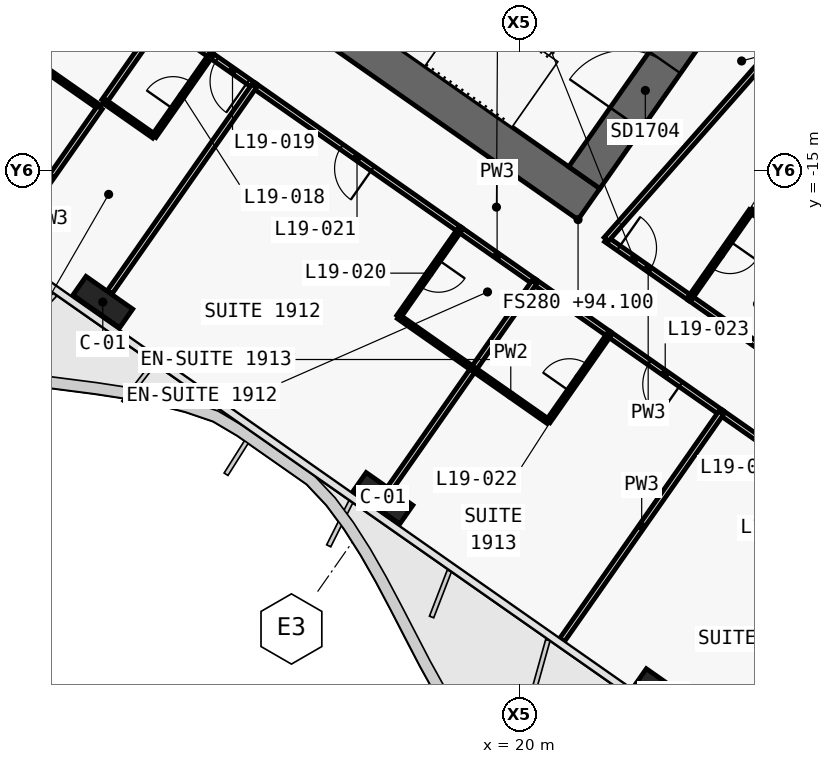
"""IFC4 building model, lengths in metres.
Left out: names, types, materials, properties, quantities, classifications, styles, units other than length and angle.
Written with IfcOpenShell. Run it as: python <this file> out.ifc"""

import sys

from ifc_helpers import new_model, si_unit, direction, frame, frame_2d, origin, origin_2d, place, context, subcontext, project, spatial, polyline, rectangle, outline, extrude, element, fill, save


model = new_model("IFC4")
c1 = context("Model", 3, precision=1e-05, world=origin(), true_north=direction((0.0, 1.0)))
c2 = subcontext(c1, "Body", "Model", "MODEL_VIEW")
j1 = project(units=[si_unit("LENGTHUNIT", "METRE"), si_unit("PLANEANGLEUNIT", "RADIAN")], contexts=[c1])
p1 = place(None, origin())
s1 = spatial("IfcSite", under=j1, at=p1, CompositionType="ELEMENT")
p2 = place(p1, origin())
s2 = spatial("IfcBuilding", under=s1, at=p2, CompositionType="ELEMENT")
p3 = place(p2, frame((0.0, 0.0, 94.1)))
s3 = spatial("IfcBuildingStorey", under=s2, at=p3, CompositionType="ELEMENT", Elevation=94.1)
p4 = place(p3, frame((-0.037, -0.585, 0.0), z_axis=(0.0, 0.0, 1.0), x_axis=(0.819157152511, -0.573569140985, 0.0)))
e1 = element("IfcWall", 1, at=p4, inside=s3, PredefinedType="SHEAR", context=c2, shape_type="SweptSolid", body=[
    extrude(outline(polyline([(26.695, 0.5), (0.0, 0.5), (0.7, -0.5), (26.695, -0.5), (26.695, 0.5)])), origin(), (0.0, 0.0, 1.0), 3.6),
])
p5 = place(p4, frame((6.695, 0.0, 0.0)))
e2 = element("IfcOpeningElement", 2, at=p5, cuts=e1, PredefinedType="OPENING", context=c2, shape_type="SweptSolid", body=[
    extrude(rectangle(XDim=1.5, YDim=2.1, at=frame_2d((0.75, 1.05))), frame((0.0, 0.51, 0.0), z_axis=(0.0, -1.0, 0.0), x_axis=(1.0, 0.0, 0.0)), (0.0, 0.0, 1.0), 1.02),
])
p6 = place(p4, frame((12.445, 0.0, 0.0)))
e3 = element("IfcOpeningElement", 3, at=p6, cuts=e1, PredefinedType="OPENING", context=c2, shape_type="SweptSolid", body=[
    extrude(rectangle(XDim=1.5, YDim=2.1, at=frame_2d((0.75, 1.05))), frame((0.0, 0.51, 0.0), z_axis=(0.0, -1.0, 0.0), x_axis=(1.0, 0.0, 0.0)), (0.0, 0.0, 1.0), 1.02),
])
p7 = place(p3, frame((21.708, -15.2, 0.0), z_axis=(0.0, 0.0, 1.0), x_axis=(0.573576324356, 0.819152122709, 0.0)))
e4 = element("IfcWall", 4, at=p7, inside=s3, PredefinedType="SHEAR", context=c2, shape_type="SweptSolid", body=[
    extrude(outline(polyline([(9.2, 0.5), (0.0, 0.5), (0.0, -0.5), (9.2, -0.5), (9.2, 0.5)])), origin(), (0.0, 0.0, 1.0), 3.6),
])
p8 = place(p7, frame((6.1, 0.0, 0.0)))
e5 = element("IfcOpeningElement", 5, at=p8, cuts=e4, PredefinedType="OPENING", context=c2, shape_type="SweptSolid", body=[
    extrude(rectangle(XDim=1.8, YDim=2.1, at=frame_2d((0.9, 1.05))), frame((0.0, 0.51, 0.0), z_axis=(0.0, -1.0, 0.0), x_axis=(1.0, 0.0, 0.0)), (0.0, 0.0, 1.0), 1.02),
])
p9 = place(p7, frame((1.9, 0.0, 0.0)))
e6 = element("IfcOpeningElement", 6, at=p9, cuts=e4, PredefinedType="OPENING", context=c2, shape_type="SweptSolid", body=[
    extrude(rectangle(XDim=1.8, YDim=2.1, at=frame_2d((0.9, 1.05))), frame((0.0, 0.51, 0.0), z_axis=(0.0, -1.0, 0.0), x_axis=(1.0, 0.0, 0.0)), (0.0, 0.0, 1.0), 1.02),
])
for number, where, z_axis, x_axis in (
    (7, (9.038, -18.475, 0.0), (0.0, 0.0, 1.0), (0.819, -0.574, 0.0)),
    (8, (16.41, -23.637, 0.0), (0.0, 0.0, 1.0), (0.819, -0.574, 0.0)),
    (9, (23.782, -28.799, 0.0), (0.0, 0.0, 1.0), (0.819, -0.574, 0.0)),
):
    element("IfcColumn", number, at=place(p3, frame(where, z_axis=z_axis, x_axis=x_axis)), inside=s3, PredefinedType="COLUMN", context=c2, shape_type="SweptSolid", body=[
        extrude(rectangle(XDim=1.5, YDim=0.6, at=origin_2d()), origin(), (0.0, 0.0, 1.0), 3.6),
    ])
p10 = place(p3, frame((22.284, -16.824, 0.0), z_axis=(0.0, 0.0, 1.0), x_axis=(0.819176640776, -0.573541307325, 0.0)))
e10 = element("IfcWall", 10, at=p10, inside=s3, PredefinedType="PARTITIONING", context=c2, shape_type="SweptSolid", body=[
    extrude(rectangle(XDim=2.698, YDim=0.15, at=frame_2d((1.349, 0.0))), origin(), (0.0, 0.0, 1.0), 3.32),
])
p11 = place(p10, frame((0.396, 0.0, 0.0)))
e11 = element("IfcOpeningElement", 11, at=p11, cuts=e10, PredefinedType="OPENING", context=c2, shape_type="SweptSolid", body=[
    extrude(rectangle(XDim=1.0, YDim=2.1, at=frame_2d((0.5, 1.05))), frame((0.0, 0.085, 0.0), z_axis=(0.0, -1.0, 0.0), x_axis=(1.0, 0.0, 0.0)), (0.0, 0.0, 1.0), 0.17),
])
p12 = place(p3, frame((24.491, -18.369, 0.0), z_axis=(0.0, 0.0, 1.0), x_axis=(0.819179439794, -0.573537309527, 0.0)))
e12 = element("IfcWall", 12, at=p12, inside=s3, PredefinedType="PARTITIONING", context=c2, shape_type="SweptSolid", body=[
    extrude(rectangle(XDim=2.404, YDim=0.15, at=frame_2d((1.202, 0.0))), origin(), (0.0, 0.0, 1.0), 3.32),
])
p13 = place(p3, frame((13.026, -12.783, 0.0), z_axis=(0.0, 0.0, 1.0), x_axis=(-0.81914197737, 0.573590813132, 0.0)))
e13 = element("IfcWall", 13, at=p13, inside=s3, PredefinedType="PARTITIONING", context=c2, shape_type="SweptSolid", body=[
    extrude(rectangle(XDim=1.403, YDim=0.15, at=frame_2d((0.701, 0.0))), origin(), (0.0, 0.0, 1.0), 2.6),
])
p14 = place(p13, frame((0.202, 0.0, 0.0)))
e14 = element("IfcOpeningElement", 14, at=p14, cuts=e13, PredefinedType="OPENING", context=c2, shape_type="SweptSolid", body=[
    extrude(rectangle(XDim=1.0, YDim=2.1, at=frame_2d((0.5, 1.05))), frame((0.0, 0.085, 0.0), z_axis=(0.0, -1.0, 0.0), x_axis=(1.0, 0.0, 0.0)), (0.0, 0.0, 1.0), 0.17),
])
p15 = place(p3, frame((11.879, -11.98, 0.0), z_axis=(0.0, 0.0, 1.0), x_axis=(-0.819189013667, 0.573523634986, 0.0)))
e15 = element("IfcWall", 15, at=p15, inside=s3, PredefinedType="PARTITIONING", context=c2, shape_type="SweptSolid", body=[
    extrude(rectangle(XDim=1.604, YDim=0.15, at=frame_2d((0.802, 0.0))), origin(), (0.0, 0.0, 1.0), 3.32),
])
p16 = place(p3, frame((18.431, -16.568, 0.0), z_axis=(0.0, 0.0, 1.0), x_axis=(-0.819141582452, 0.573591377113, 0.0)))
e16 = element("IfcWall", 16, at=p16, inside=s3, PredefinedType="PARTITIONING", context=c2, shape_type="SweptSolid", body=[
    extrude(rectangle(XDim=6.603, YDim=0.15, at=frame_2d((3.301, 0.0))), origin(), (0.0, 0.0, 1.0), 2.6),
])
p17 = place(p16, frame((2.801, 0.0, 0.0)))
e17 = element("IfcOpeningElement", 17, at=p17, cuts=e16, PredefinedType="OPENING", context=c2, shape_type="SweptSolid", body=[
    extrude(rectangle(XDim=1.0, YDim=2.1, at=frame_2d((0.5, 1.05))), frame((0.0, 0.085, 0.0), z_axis=(0.0, -1.0, 0.0), x_axis=(1.0, 0.0, 0.0)), (0.0, 0.0, 1.0), 0.17),
])
p18 = place(p3, frame((20.398, -17.945, 0.0), z_axis=(0.0, 0.0, 1.0), x_axis=(-0.819146032251, 0.573585022335, 0.0)))
e18 = element("IfcWall", 18, at=p18, inside=s3, PredefinedType="PARTITIONING", context=c2, shape_type="SweptSolid", body=[
    extrude(rectangle(XDim=2.404, YDim=0.15, at=frame_2d((1.202, 0.0))), origin(), (0.0, 0.0, 1.0), 2.6),
])
p19 = place(p3, frame((25.313, -21.387, 0.0), z_axis=(0.0, 0.0, 1.0), x_axis=(-0.819145961204, 0.573585123798, 0.0)))
e19 = element("IfcWall", 19, at=p19, inside=s3, PredefinedType="PARTITIONING", context=c2, shape_type="SweptSolid", body=[
    extrude(rectangle(XDim=3.603, YDim=0.15, at=frame_2d((1.802, 0.0))), origin(), (0.0, 0.0, 1.0), 3.32),
])
p20 = place(p19, frame((1.302, 0.0, 0.0)))
e20 = element("IfcOpeningElement", 20, at=p20, cuts=e19, PredefinedType="OPENING", context=c2, shape_type="SweptSolid", body=[
    extrude(rectangle(XDim=1.0, YDim=2.1, at=frame_2d((0.5, 1.05))), frame((0.0, 0.085, 0.0), z_axis=(0.0, -1.0, 0.0), x_axis=(1.0, 0.0, 0.0)), (0.0, 0.0, 1.0), 0.17),
])
p21 = place(p3, frame((22.364, -19.322, 0.0), z_axis=(0.0, 0.0, 1.0), x_axis=(-0.819146032251, 0.573585022335, 0.0)))
e21 = element("IfcWall", 21, at=p21, inside=s3, PredefinedType="PARTITIONING", context=c2, shape_type="SweptSolid", body=[
    extrude(rectangle(XDim=2.404, YDim=0.15, at=frame_2d((1.202, 0.0))), origin(), (0.0, 0.0, 1.0), 2.6),
])
p22 = place(p3, frame((30.719, -25.172, 0.0), z_axis=(0.0, 0.0, 1.0), x_axis=(-0.819153746897, 0.573574004767, 0.0)))
e22 = element("IfcWall", 22, at=p22, inside=s3, PredefinedType="PARTITIONING", context=c2, shape_type="SweptSolid", body=[
    extrude(rectangle(XDim=6.603, YDim=0.15, at=frame_2d((3.302, 0.0))), origin(), (0.0, 0.0, 1.0), 2.6),
])
p23 = place(p22, frame((2.801, 0.0, 0.0)))
e23 = element("IfcOpeningElement", 23, at=p23, cuts=e22, PredefinedType="OPENING", context=c2, shape_type="SweptSolid", body=[
    extrude(rectangle(XDim=1.0, YDim=2.1, at=frame_2d((0.5, 1.05))), frame((0.0, 0.085, 0.0), z_axis=(0.0, -1.0, 0.0), x_axis=(1.0, 0.0, 0.0)), (0.0, 0.0, 1.0), 0.17),
])
p24 = place(p3, frame((26.098, -16.076, 0.0), z_axis=(0.0, 0.0, 1.0), x_axis=(-0.573550118428, -0.819170471667, 0.0)))
e24 = element("IfcWall", 24, at=p24, inside=s3, PredefinedType="PARTITIONING", context=c2, shape_type="SweptSolid", body=[
    extrude(rectangle(XDim=2.8, YDim=0.12, at=frame_2d((1.4, 0.0))), origin(), (0.0, 0.0, 1.0), 2.6),
])
p25 = place(p24, frame((0.975, 0.0, 0.0)))
e25 = element("IfcOpeningElement", 25, at=p25, cuts=e24, PredefinedType="OPENING", context=c2, shape_type="SweptSolid", body=[
    extrude(rectangle(XDim=0.85, YDim=2.05, at=frame_2d((0.425, 1.025))), frame((0.0, 0.07, 0.0), z_axis=(0.0, -1.0, 0.0), x_axis=(1.0, 0.0, 0.0)), (0.0, 0.0, 1.0), 0.14),
])
p26 = place(p3, frame((28.065, -17.453, 0.0), z_axis=(0.0, 0.0, 1.0), x_axis=(-0.819155442668, 0.573571582932, 0.0)))
e26 = element("IfcWall", 26, at=p26, inside=s3, PredefinedType="PARTITIONING", context=c2, shape_type="SweptSolid", body=[
    extrude(rectangle(XDim=2.4, YDim=0.12, at=frame_2d((1.2, 0.0))), origin(), (0.0, 0.0, 1.0), 3.32),
])
p27 = place(p3, frame((22.285, -16.825, 0.0), z_axis=(0.0, 0.0, 1.0), x_axis=(0.661551268245, 0.749899939647, 0.0)))
e27 = element("IfcWall", 27, at=p27, inside=s3, PredefinedType="PARTITIONING", context=c2, shape_type="SweptSolid", body=[
    extrude(rectangle(XDim=6.541, YDim=0.15, at=frame_2d((3.271, 0.0))), origin(), (0.0, 0.0, 1.0), 2.6),
])
p28 = place(p3, frame((8.6, -9.684, 0.0), z_axis=(0.0, 0.0, 1.0), x_axis=(-0.573550118428, -0.819170471667, 0.0)))
e28 = element("IfcWall", 28, at=p28, inside=s3, PredefinedType="PARTITIONING", context=c2, shape_type="SweptSolid", body=[
    extrude(rectangle(XDim=2.8, YDim=0.12, at=frame_2d((1.4, 0.0))), origin(), (0.0, 0.0, 1.0), 3.32),
])
p29 = place(p28, frame((0.975, 0.0, 0.0)))
e29 = element("IfcOpeningElement", 29, at=p29, cuts=e28, PredefinedType="OPENING", context=c2, shape_type="SweptSolid", body=[
    extrude(rectangle(XDim=0.85, YDim=2.05, at=frame_2d((0.425, 1.025))), frame((0.0, 0.07, 0.0), z_axis=(0.0, -1.0, 0.0), x_axis=(1.0, 0.0, 0.0)), (0.0, 0.0, 1.0), 0.14),
])
p30 = place(p3, frame((6.994, -11.979, 0.0), z_axis=(0.0, 0.0, 1.0), x_axis=(0.819188907105, -0.573523787192, 0.0)))
e30 = element("IfcWall", 30, at=p30, inside=s3, PredefinedType="PARTITIONING", context=c2, shape_type="SweptSolid", body=[
    extrude(rectangle(XDim=2.4, YDim=0.12, at=frame_2d((1.2, 0.0))), origin(), (0.0, 0.0, 1.0), 3.32),
])
p31 = place(p3, frame((8.96, -13.355, 0.0), z_axis=(0.0, 0.0, 1.0), x_axis=(-0.573564311442, -0.819160534108, 0.0)))
e31 = element("IfcWall", 31, at=p31, inside=s3, PredefinedType="PARTITIONING", context=c2, shape_type="SweptSolid", body=[
    extrude(rectangle(XDim=4.499, YDim=0.15, at=frame_2d((2.25, 0.0))), origin(), (0.0, 0.0, 1.0), 2.5),
])
p32 = place(p3, frame((10.567, -11.061, 0.0), z_axis=(0.0, 0.0, 1.0), x_axis=(-0.573588285102, -0.819143747577, 0.0)))
e32 = element("IfcWall", 32, at=p32, inside=s3, PredefinedType="PARTITIONING", context=c2, shape_type="SweptSolid", body=[
    extrude(rectangle(XDim=2.602, YDim=0.15, at=frame_2d((1.301, 0.0))), origin(), (0.0, 0.0, 1.0), 3.32),
])
p33 = place(p3, frame((9.075, -13.192, 0.0), z_axis=(0.0, 0.0, 1.0), x_axis=(0.819131543282, -0.57360571371, 0.0)))
e33 = element("IfcWall", 33, at=p33, inside=s3, PredefinedType="PARTITIONING", context=c2, shape_type="SweptSolid", body=[
    extrude(rectangle(XDim=1.6, YDim=0.12, at=frame_2d((0.8, 0.0))), origin(), (0.0, 0.0, 1.0), 3.32),
])
p34 = place(p3, frame((10.387, -14.109, 0.0), z_axis=(0.0, 0.0, 1.0), x_axis=(0.573582085028, 0.819148089014, 0.0)))
e34 = element("IfcWall", 34, at=p34, inside=s3, PredefinedType="PARTITIONING", context=c2, shape_type="SweptSolid", body=[
    extrude(rectangle(XDim=2.6, YDim=0.12, at=frame_2d((1.3, 0.0))), origin(), (0.0, 0.0, 1.0), 3.32),
])
p35 = place(p34, frame((0.875, 0.0, 0.0)))
e35 = element("IfcOpeningElement", 35, at=p35, cuts=e34, PredefinedType="OPENING", context=c2, shape_type="SweptSolid", body=[
    extrude(rectangle(XDim=0.85, YDim=2.05, at=frame_2d((0.425, 1.025))), frame((0.0, 0.07, 0.0), z_axis=(0.0, -1.0, 0.0), x_axis=(1.0, 0.0, 0.0)), (0.0, 0.0, 1.0), 0.14),
])
p36 = place(p3, frame((13.024, -12.782, 0.0), z_axis=(0.0, 0.0, 1.0), x_axis=(-0.573556251799, -0.819166177294, 0.0)))
e36 = element("IfcWall", 36, at=p36, inside=s3, PredefinedType="PARTITIONING", context=c2, shape_type="SweptSolid", body=[
    extrude(rectangle(XDim=6.63, YDim=0.15, at=frame_2d((3.315, 0.0))), origin(), (0.0, 0.0, 1.0), 2.6),
])
p37 = place(p3, frame((18.43, -16.567, 0.0), z_axis=(0.0, 0.0, 1.0), x_axis=(-0.573608623498, -0.819129505664, 0.0)))
e37 = element("IfcWall", 37, at=p37, inside=s3, PredefinedType="PARTITIONING", context=c2, shape_type="SweptSolid", body=[
    extrude(rectangle(XDim=2.8, YDim=0.12, at=frame_2d((1.4, 0.0))), origin(), (0.0, 0.0, 1.0), 3.32),
])
p38 = place(p37, frame((0.975, 0.0, 0.0)))
e38 = element("IfcOpeningElement", 38, at=p38, cuts=e37, PredefinedType="OPENING", context=c2, shape_type="SweptSolid", body=[
    extrude(rectangle(XDim=0.85, YDim=2.05, at=frame_2d((0.425, 1.025))), frame((0.0, 0.07, 0.0), z_axis=(0.0, -1.0, 0.0), x_axis=(1.0, 0.0, 0.0)), (0.0, 0.0, 1.0), 0.14),
])
p39 = place(p3, frame((16.824, -18.862, 0.0), z_axis=(0.0, 0.0, 1.0), x_axis=(0.819141114317, -0.573592045652, 0.0)))
e39 = element("IfcWall", 39, at=p39, inside=s3, PredefinedType="PARTITIONING", context=c2, shape_type="SweptSolid", body=[
    extrude(rectangle(XDim=2.4, YDim=0.12, at=frame_2d((1.2, 0.0))), origin(), (0.0, 0.0, 1.0), 2.6),
])
p40 = place(p3, frame((18.79, -20.239, 0.0), z_axis=(0.0, 0.0, 1.0), x_axis=(-0.573594994199, -0.819139049631, 0.0)))
e40 = element("IfcWall", 40, at=p40, inside=s3, PredefinedType="PARTITIONING", context=c2, shape_type="SweptSolid", body=[
    extrude(rectangle(XDim=3.829, YDim=0.15, at=frame_2d((1.915, 0.0))), origin(), (0.0, 0.0, 1.0), 2.6),
])
p41 = place(p3, frame((20.396, -17.944, 0.0), z_axis=(0.0, 0.0, 1.0), x_axis=(-0.57364959175, -0.819100815459, 0.0)))
e41 = element("IfcWall", 41, at=p41, inside=s3, PredefinedType="PARTITIONING", context=c2, shape_type="SweptSolid", body=[
    extrude(rectangle(XDim=2.8, YDim=0.15, at=frame_2d((1.4, 0.0))), origin(), (0.0, 0.0, 1.0), 2.6),
])
p42 = place(p3, frame((18.79, -20.239, 0.0), z_axis=(0.0, 0.0, 1.0), x_axis=(0.819188907105, -0.573523787192, 0.0)))
e42 = element("IfcWall", 42, at=p42, inside=s3, PredefinedType="PARTITIONING", context=c2, shape_type="SweptSolid", body=[
    extrude(rectangle(XDim=2.4, YDim=0.12, at=frame_2d((1.2, 0.0))), origin(), (0.0, 0.0, 1.0), 2.6),
])
p43 = place(p3, frame((20.757, -21.615, 0.0), z_axis=(0.0, 0.0, 1.0), x_axis=(0.57364959175, 0.819100815459, 0.0)))
e43 = element("IfcWall", 43, at=p43, inside=s3, PredefinedType="PARTITIONING", context=c2, shape_type="SweptSolid", body=[
    extrude(rectangle(XDim=2.8, YDim=0.12, at=frame_2d((1.4, 0.0))), origin(), (0.0, 0.0, 1.0), 3.32),
])
p44 = place(p43, frame((0.975, 0.0, 0.0)))
e44 = element("IfcOpeningElement", 44, at=p44, cuts=e43, PredefinedType="OPENING", context=c2, shape_type="SweptSolid", body=[
    extrude(rectangle(XDim=0.85, YDim=2.05, at=frame_2d((0.425, 1.025))), frame((0.0, 0.07, 0.0), z_axis=(0.0, -1.0, 0.0), x_axis=(1.0, 0.0, 0.0)), (0.0, 0.0, 1.0), 0.14),
])
p45 = place(p3, frame((25.311, -21.385, 0.0), z_axis=(0.0, 0.0, 1.0), x_axis=(-0.573572324301, -0.819154923562, 0.0)))
e45 = element("IfcWall", 45, at=p45, inside=s3, PredefinedType="PARTITIONING", context=c2, shape_type="SweptSolid", body=[
    extrude(rectangle(XDim=7.3, YDim=0.15, at=frame_2d((3.65, 0.0))), origin(), (0.0, 0.0, 1.0), 2.5),
])
p46 = place(p9, origin())
e46 = element("IfcDoor", 46, at=p46, inside=s3, OperationType="DOUBLE_DOOR_SINGLE_SWING", PredefinedType="DOOR", context=c2, shape_type="SweptSolid", body=[
    extrude(rectangle(XDim=1.8, YDim=2.1, at=frame_2d((0.9, 1.05))), frame((0.0, 0.025, 0.0), z_axis=(0.0, -1.0, 0.0), x_axis=(1.0, 0.0, 0.0)), (0.0, 0.0, 1.0), 0.05),
])
fill(e6, e46)
p47 = place(p35, origin())
e47 = element("IfcDoor", 47, at=p47, inside=s3, OperationType="SINGLE_SWING_LEFT", PredefinedType="DOOR", context=c2, shape_type="SweptSolid", body=[
    extrude(rectangle(XDim=0.85, YDim=2.05, at=frame_2d((0.425, 1.025))), frame((0.0, 0.025, 0.0), z_axis=(0.0, -1.0, 0.0), x_axis=(1.0, 0.0, 0.0)), (0.0, 0.0, 1.0), 0.05),
])
fill(e35, e47)
p48 = place(p14, origin())
e48 = element("IfcDoor", 48, at=p48, inside=s3, OperationType="SINGLE_SWING_RIGHT", PredefinedType="DOOR", context=c2, shape_type="SweptSolid", body=[
    extrude(rectangle(XDim=1.0, YDim=2.1, at=frame_2d((0.5, 1.05))), frame((0.0, 0.025, 0.0), z_axis=(0.0, -1.0, 0.0), x_axis=(1.0, 0.0, 0.0)), (0.0, 0.0, 1.0), 0.05),
])
fill(e14, e48)
p49 = place(p38, origin())
e49 = element("IfcDoor", 49, at=p49, inside=s3, OperationType="SINGLE_SWING_RIGHT", PredefinedType="DOOR", context=c2, shape_type="SweptSolid", body=[
    extrude(rectangle(XDim=0.85, YDim=2.05, at=frame_2d((0.425, 1.025))), frame((0.0, 0.025, 0.0), z_axis=(0.0, -1.0, 0.0), x_axis=(1.0, 0.0, 0.0)), (0.0, 0.0, 1.0), 0.05),
])
fill(e38, e49)
p50 = place(p17, origin())
e50 = element("IfcDoor", 50, at=p50, inside=s3, OperationType="SINGLE_SWING_RIGHT", PredefinedType="DOOR", context=c2, shape_type="SweptSolid", body=[
    extrude(rectangle(XDim=1.0, YDim=2.1, at=frame_2d((0.5, 1.05))), frame((0.0, 0.025, 0.0), z_axis=(0.0, -1.0, 0.0), x_axis=(1.0, 0.0, 0.0)), (0.0, 0.0, 1.0), 0.05),
])
fill(e17, e50)
p51 = place(p44, origin())
e51 = element("IfcDoor", 51, at=p51, inside=s3, OperationType="SINGLE_SWING_RIGHT", PredefinedType="DOOR", context=c2, shape_type="SweptSolid", body=[
    extrude(rectangle(XDim=0.85, YDim=2.05, at=frame_2d((0.425, 1.025))), frame((0.0, 0.025, 0.0), z_axis=(0.0, -1.0, 0.0), x_axis=(1.0, 0.0, 0.0)), (0.0, 0.0, 1.0), 0.05),
])
fill(e44, e51)
p52 = place(p20, origin())
e52 = element("IfcDoor", 52, at=p52, inside=s3, OperationType="SINGLE_SWING_LEFT", PredefinedType="DOOR", context=c2, shape_type="SweptSolid", body=[
    extrude(rectangle(XDim=1.0, YDim=2.1, at=frame_2d((0.5, 1.05))), frame((0.0, 0.025, 0.0), z_axis=(0.0, -1.0, 0.0), x_axis=(1.0, 0.0, 0.0)), (0.0, 0.0, 1.0), 0.05),
])
fill(e20, e52)
p53 = place(p25, origin())
e53 = element("IfcDoor", 53, at=p53, inside=s3, OperationType="SINGLE_SWING_LEFT", PredefinedType="DOOR", context=c2, shape_type="SweptSolid", body=[
    extrude(rectangle(XDim=0.85, YDim=2.05, at=frame_2d((0.425, 1.025))), frame((0.0, 0.025, 0.0), z_axis=(0.0, -1.0, 0.0), x_axis=(1.0, 0.0, 0.0)), (0.0, 0.0, 1.0), 0.05),
])
fill(e25, e53)
p54 = place(p11, origin())
e54 = element("IfcDoor", 54, at=p54, inside=s3, OperationType="SINGLE_SWING_RIGHT", PredefinedType="DOOR", context=c2, shape_type="SweptSolid", body=[
    extrude(rectangle(XDim=1.0, YDim=2.1, at=frame_2d((0.5, 1.05))), frame((0.0, 0.025, 0.0), z_axis=(0.0, -1.0, 0.0), x_axis=(1.0, 0.0, 0.0)), (0.0, 0.0, 1.0), 0.05),
])
fill(e11, e54)
save(model, sys.argv[1])
